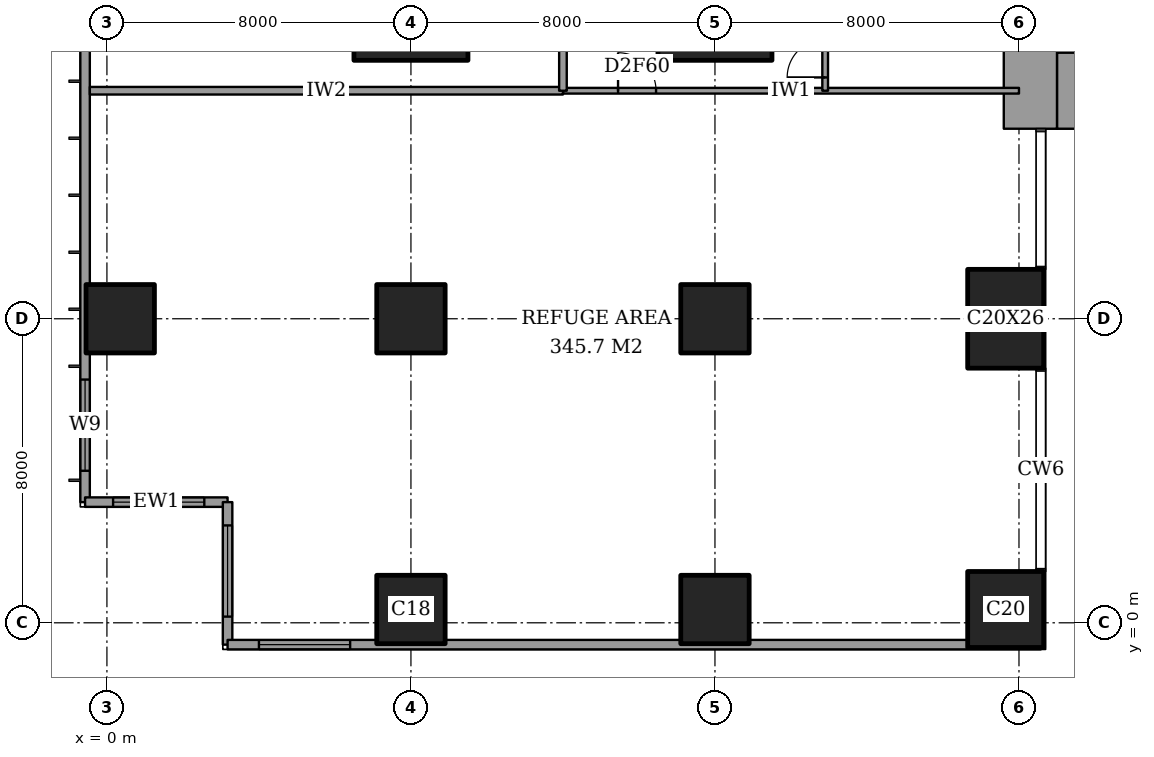
"""IFC4 building model, lengths in metres.
Left out: names, types, materials, properties, quantities, classifications, styles, units other than length and angle.
Written with IfcOpenShell. Run it as: python <this file> out.ifc"""

import sys

from ifc_helpers import new_model, si_unit, direction, frame, frame_2d, origin, origin_2d, place, context, subcontext, project, spatial, rectangle, extrude, element, fill, save


model = new_model("IFC4")
c1 = context("Model", 3, precision=1e-05, world=origin(), true_north=direction((0.0, 1.0)))
c2 = subcontext(c1, "Body", "Model", "MODEL_VIEW")
j1 = project(units=[si_unit("LENGTHUNIT", "METRE"), si_unit("PLANEANGLEUNIT", "RADIAN")], contexts=[c1])
p1 = place(None, origin())
s1 = spatial("IfcSite", under=j1, at=p1, CompositionType="ELEMENT")
p2 = place(p1, origin())
s2 = spatial("IfcBuilding", under=s1, at=p2, CompositionType="ELEMENT")
p3 = place(p2, frame((0.0, 0.0, 171.8)))
s3 = spatial("IfcBuildingStorey", under=s2, at=p3, CompositionType="ELEMENT", Elevation=171.8)
for number, where, z_axis, x_axis in (
    (1, (0.35, 8.0, 0.0), (0.0, 0.0, 1.0), (1.0, 0.0, 0.0)),
    (2, (8.0, 0.35, 0.0), (0.0, 0.0, 1.0), (1.0, 0.0, 0.0)),
    (3, (8.0, 8.0, 0.0), (0.0, 0.0, 1.0), (1.0, 0.0, 0.0)),
):
    element("IfcColumn", number, at=place(p3, frame(where, z_axis=z_axis, x_axis=x_axis)), inside=s3, PredefinedType="COLUMN", context=c2, shape_type="SweptSolid", body=[
        extrude(rectangle(XDim=1.8, YDim=1.8, at=origin_2d()), origin(), (0.0, 0.0, 1.0), 5.4),
    ])
p4 = place(p3, frame((8.0, 16.0, 0.0), z_axis=(0.0, 0.0, 1.0), x_axis=(1.0, 0.0, 0.0)))
e4 = element("IfcColumn", 4, at=p4, inside=s3, PredefinedType="COLUMN", context=c2, shape_type="SweptSolid", body=[
    extrude(rectangle(XDim=3.0, YDim=2.4, at=origin_2d()), origin(), (0.0, 0.0, 1.0), 5.4),
])
for number, where, z_axis, x_axis in (
    (5, (16.0, 0.35, 0.0), (0.0, 0.0, 1.0), (1.0, 0.0, 0.0)),
    (6, (16.0, 8.0, 0.0), (0.0, 0.0, 1.0), (1.0, 0.0, 0.0)),
):
    element("IfcColumn", number, at=place(p3, frame(where, z_axis=z_axis, x_axis=x_axis)), inside=s3, PredefinedType="COLUMN", context=c2, shape_type="SweptSolid", body=[
        extrude(rectangle(XDim=1.8, YDim=1.8, at=origin_2d()), origin(), (0.0, 0.0, 1.0), 5.4),
    ])
p5 = place(p3, frame((16.0, 16.0, 0.0), z_axis=(0.0, 0.0, 1.0), x_axis=(1.0, 0.0, 0.0)))
e7 = element("IfcColumn", 7, at=p5, inside=s3, PredefinedType="COLUMN", context=c2, shape_type="SweptSolid", body=[
    extrude(rectangle(XDim=3.0, YDim=2.4, at=origin_2d()), origin(), (0.0, 0.0, 1.0), 5.4),
])
p6 = place(p3, frame((23.65, 0.35, 0.0), z_axis=(0.0, 0.0, 1.0), x_axis=(1.0, 0.0, 0.0)))
e8 = element("IfcColumn", 8, at=p6, inside=s3, PredefinedType="COLUMN", context=c2, shape_type="SweptSolid", body=[
    extrude(rectangle(XDim=2.0, YDim=2.0, at=origin_2d()), origin(), (0.0, 0.0, 1.0), 5.4),
])
p7 = place(p3, frame((23.65, 8.0, 0.0), z_axis=(0.0, 0.0, 1.0), x_axis=(1.0, 0.0, 0.0)))
e9 = element("IfcColumn", 9, at=p7, inside=s3, PredefinedType="COLUMN", context=c2, shape_type="SweptSolid", body=[
    extrude(rectangle(XDim=2.0, YDim=2.6, at=origin_2d()), origin(), (0.0, 0.0, 1.0), 5.4),
])
p8 = place(p3, frame((25.0, 14.0, 0.0), z_axis=(0.0, 0.0, 1.0), x_axis=(1.0, 0.0, 0.0)))
e10 = element("IfcWall", 10, at=p8, inside=s3, PredefinedType="SHEAR", context=c2, shape_type="SweptSolid", body=[
    extrude(rectangle(XDim=3.15, YDim=2.0, at=frame_2d((1.575, 0.0))), origin(), (0.0, 0.0, 1.0), 5.4),
])
p9 = place(p3, frame((24.3, 13.0, 0.0), z_axis=(0.0, 0.0, 1.0), x_axis=(0.0, 1.0, 0.0)))
e11 = element("IfcWall", 11, at=p9, inside=s3, PredefinedType="SHEAR", context=c2, shape_type="SweptSolid", body=[
    extrude(rectangle(XDim=10.15, YDim=1.4, at=frame_2d((5.075, 0.0))), origin(), (0.0, 0.0, 1.0), 5.4),
])
p10 = place(p3, frame((-0.575, 44.825, 0.0), z_axis=(0.0, 0.0, 1.0), x_axis=(0.0, -1.0, 0.0)))
e12 = element("IfcWall", 12, at=p10, inside=s3, PredefinedType="SOLIDWALL", context=c2, shape_type="SweptSolid", body=[
    extrude(rectangle(XDim=41.65, YDim=0.25, at=frame_2d((20.825, 0.0))), origin(), (0.0, 0.0, 1.0), 5.4),
])
p11 = place(p10, frame((0.825, 0.0, 0.9)))
e13 = element("IfcOpeningElement", 13, at=p11, cuts=e12, PredefinedType="OPENING", context=c2, shape_type="SweptSolid", body=[
    extrude(rectangle(XDim=2.4, YDim=2.4, at=frame_2d((1.2, 1.2))), frame((0.0, 0.135, 0.0), z_axis=(0.0, -1.0, 0.0), x_axis=(1.0, 0.0, 0.0)), (0.0, 0.0, 1.0), 0.27),
])
p12 = place(p10, frame((38.425, 0.0, 0.9)))
e14 = element("IfcOpeningElement", 14, at=p12, cuts=e12, PredefinedType="OPENING", context=c2, shape_type="SweptSolid", body=[
    extrude(rectangle(XDim=2.4, YDim=2.4, at=frame_2d((1.2, 1.2))), frame((0.0, 0.135, 0.0), z_axis=(0.0, -1.0, 0.0), x_axis=(1.0, 0.0, 0.0)), (0.0, 0.0, 1.0), 0.27),
])
p13 = place(p3, frame((-0.575, 3.175, 0.0), z_axis=(0.0, 0.0, 1.0), x_axis=(1.0, 0.0, 0.0)))
e15 = element("IfcWall", 15, at=p13, inside=s3, PredefinedType="SOLIDWALL", context=c2, shape_type="SweptSolid", body=[
    extrude(rectangle(XDim=3.75, YDim=0.25, at=frame_2d((1.875, 0.0))), origin(), (0.0, 0.0, 1.0), 5.4),
])
p14 = place(p13, frame((0.738, 0.0, 0.9)))
e16 = element("IfcOpeningElement", 16, at=p14, cuts=e15, PredefinedType="OPENING", context=c2, shape_type="SweptSolid", body=[
    extrude(rectangle(XDim=2.4, YDim=2.4, at=frame_2d((1.2, 1.2))), frame((0.0, 0.135, 0.0), z_axis=(0.0, -1.0, 0.0), x_axis=(1.0, 0.0, 0.0)), (0.0, 0.0, 1.0), 0.27),
])
p15 = place(p3, frame((3.175, 3.175, 0.0), z_axis=(0.0, 0.0, 1.0), x_axis=(0.0, -1.0, 0.0)))
e17 = element("IfcWall", 17, at=p15, inside=s3, PredefinedType="SOLIDWALL", context=c2, shape_type="SweptSolid", body=[
    extrude(rectangle(XDim=3.75, YDim=0.25, at=frame_2d((1.875, 0.0))), origin(), (0.0, 0.0, 1.0), 5.4),
])
p16 = place(p15, frame((0.613, 0.0, 0.9)))
e18 = element("IfcOpeningElement", 18, at=p16, cuts=e17, PredefinedType="OPENING", context=c2, shape_type="SweptSolid", body=[
    extrude(rectangle(XDim=2.4, YDim=2.4, at=frame_2d((1.2, 1.2))), frame((0.0, 0.135, 0.0), z_axis=(0.0, -1.0, 0.0), x_axis=(1.0, 0.0, 0.0)), (0.0, 0.0, 1.0), 0.27),
])
p17 = place(p3, frame((3.175, -0.575, 0.0), z_axis=(0.0, 0.0, 1.0), x_axis=(1.0, 0.0, 0.0)))
e19 = element("IfcWall", 19, at=p17, inside=s3, PredefinedType="SOLIDWALL", context=c2, shape_type="SweptSolid", body=[
    extrude(rectangle(XDim=21.4, YDim=0.25, at=frame_2d((10.7, 0.0))), origin(), (0.0, 0.0, 1.0), 5.4),
])
p18 = place(p17, frame((0.825, 0.0, 0.9)))
e20 = element("IfcOpeningElement", 20, at=p18, cuts=e19, PredefinedType="OPENING", context=c2, shape_type="SweptSolid", body=[
    extrude(rectangle(XDim=2.4, YDim=2.4, at=frame_2d((1.2, 1.2))), frame((0.0, 0.135, 0.0), z_axis=(0.0, -1.0, 0.0), x_axis=(1.0, 0.0, 0.0)), (0.0, 0.0, 1.0), 0.27),
])
p19 = place(p3, frame((-0.45, 14.0, 0.0), z_axis=(0.0, 0.0, 1.0), x_axis=(1.0, 0.0, 0.0)))
e21 = element("IfcWall", 21, at=p19, inside=s3, PredefinedType="PARTITIONING", context=c2, shape_type="SweptSolid", body=[
    extrude(rectangle(XDim=12.45, YDim=0.2, at=frame_2d((6.225, 0.0))), origin(), (0.0, 0.0, 1.0), 5.15),
])
p20 = place(p3, frame((12.0, 14.0, 0.0), z_axis=(0.0, 0.0, 1.0), x_axis=(1.0, 0.0, 0.0)))
e22 = element("IfcWall", 22, at=p20, inside=s3, PredefinedType="PARTITIONING", context=c2, shape_type="SweptSolid", body=[
    extrude(rectangle(XDim=12.0, YDim=0.15, at=frame_2d((6.0, 0.0))), origin(), (0.0, 0.0, 1.0), 5.15),
])
p21 = place(p20, frame((1.45, 0.0, 0.0)))
e23 = element("IfcOpeningElement", 23, at=p21, cuts=e22, PredefinedType="OPENING", context=c2, shape_type="SweptSolid", body=[
    extrude(rectangle(XDim=1.0, YDim=2.1, at=frame_2d((0.5, 1.05))), frame((0.0, 0.085, 0.0), z_axis=(0.0, -1.0, 0.0), x_axis=(1.0, 0.0, 0.0)), (0.0, 0.0, 1.0), 0.17),
])
p22 = place(p3, frame((12.0, 14.0, 0.0), z_axis=(0.0, 0.0, 1.0), x_axis=(0.0, 1.0, 0.0)))
e24 = element("IfcWall", 24, at=p22, inside=s3, PredefinedType="PARTITIONING", context=c2, shape_type="SweptSolid", body=[
    extrude(rectangle(XDim=14.725, YDim=0.2, at=frame_2d((7.363, 0.0))), origin(), (0.0, 0.0, 1.0), 5.15),
])
p23 = place(p22, frame((6.863, 0.0, 0.0)))
e25 = element("IfcOpeningElement", 25, at=p23, cuts=e24, PredefinedType="OPENING", context=c2, shape_type="SweptSolid", body=[
    extrude(rectangle(XDim=1.0, YDim=2.1, at=frame_2d((0.5, 1.05))), frame((0.0, 0.11, 0.0), z_axis=(0.0, -1.0, 0.0), x_axis=(1.0, 0.0, 0.0)), (0.0, 0.0, 1.0), 0.22),
])
p24 = place(p3, frame((18.9, 14.0, 0.0), z_axis=(0.0, 0.0, 1.0), x_axis=(0.0, 1.0, 0.0)))
e26 = element("IfcWall", 26, at=p24, inside=s3, PredefinedType="PARTITIONING", context=c2, shape_type="SweptSolid", body=[
    extrude(rectangle(XDim=6.0, YDim=0.15, at=frame_2d((3.0, 0.0))), origin(), (0.0, 0.0, 1.0), 5.15),
])
p25 = place(p24, frame((0.35, 0.0, 0.0)))
e27 = element("IfcOpeningElement", 27, at=p25, cuts=e26, PredefinedType="OPENING", context=c2, shape_type="SweptSolid", body=[
    extrude(rectangle(XDim=1.0, YDim=2.1, at=frame_2d((0.5, 1.05))), frame((0.0, 0.085, 0.0), z_axis=(0.0, -1.0, 0.0), x_axis=(1.0, 0.0, 0.0)), (0.0, 0.0, 1.0), 0.17),
])
p26 = place(p24, frame((4.25, 0.0, 0.0)))
e28 = element("IfcOpeningElement", 28, at=p26, cuts=e26, PredefinedType="OPENING", context=c2, shape_type="SweptSolid", body=[
    extrude(rectangle(XDim=1.0, YDim=2.1, at=frame_2d((0.5, 1.05))), frame((0.0, 0.085, 0.0), z_axis=(0.0, -1.0, 0.0), x_axis=(1.0, 0.0, 0.0)), (0.0, 0.0, 1.0), 0.17),
])
p27 = place(p12, origin())
e29 = element("IfcWindow", 29, at=p27, inside=s3, PartitioningType="SINGLE_PANEL", PredefinedType="WINDOW", context=c2, shape_type="SweptSolid", body=[
    extrude(rectangle(XDim=2.4, YDim=2.4, at=frame_2d((1.2, 1.2))), frame((0.0, 0.03, 0.0), z_axis=(0.0, -1.0, 0.0), x_axis=(1.0, 0.0, 0.0)), (0.0, 0.0, 1.0), 0.06),
])
fill(e14, e29)
p28 = place(p14, origin())
e30 = element("IfcWindow", 30, at=p28, inside=s3, PartitioningType="SINGLE_PANEL", PredefinedType="WINDOW", context=c2, shape_type="SweptSolid", body=[
    extrude(rectangle(XDim=2.4, YDim=2.4, at=frame_2d((1.2, 1.2))), frame((0.0, 0.03, 0.0), z_axis=(0.0, -1.0, 0.0), x_axis=(1.0, 0.0, 0.0)), (0.0, 0.0, 1.0), 0.06),
])
fill(e16, e30)
p29 = place(p16, origin())
e31 = element("IfcWindow", 31, at=p29, inside=s3, PartitioningType="SINGLE_PANEL", PredefinedType="WINDOW", context=c2, shape_type="SweptSolid", body=[
    extrude(rectangle(XDim=2.4, YDim=2.4, at=frame_2d((1.2, 1.2))), frame((0.0, 0.03, 0.0), z_axis=(0.0, -1.0, 0.0), x_axis=(1.0, 0.0, 0.0)), (0.0, 0.0, 1.0), 0.06),
])
fill(e18, e31)
p30 = place(p18, origin())
e32 = element("IfcWindow", 32, at=p30, inside=s3, PartitioningType="SINGLE_PANEL", PredefinedType="WINDOW", context=c2, shape_type="SweptSolid", body=[
    extrude(rectangle(XDim=2.4, YDim=2.4, at=frame_2d((1.2, 1.2))), frame((0.0, 0.03, 0.0), z_axis=(0.0, -1.0, 0.0), x_axis=(1.0, 0.0, 0.0)), (0.0, 0.0, 1.0), 0.06),
])
fill(e20, e32)
p31 = place(p21, origin())
e33 = element("IfcDoor", 33, at=p31, inside=s3, OperationType="SINGLE_SWING_RIGHT", PredefinedType="DOOR", context=c2, shape_type="SweptSolid", body=[
    extrude(rectangle(XDim=1.0, YDim=2.1, at=frame_2d((0.5, 1.05))), frame((0.0, 0.025, 0.0), z_axis=(0.0, -1.0, 0.0), x_axis=(1.0, 0.0, 0.0)), (0.0, 0.0, 1.0), 0.05),
])
fill(e23, e33)
p32 = place(p25, origin())
e34 = element("IfcDoor", 34, at=p32, inside=s3, OperationType="SINGLE_SWING_RIGHT", PredefinedType="DOOR", context=c2, shape_type="SweptSolid", body=[
    extrude(rectangle(XDim=1.0, YDim=2.1, at=frame_2d((0.5, 1.05))), frame((0.0, 0.025, 0.0), z_axis=(0.0, -1.0, 0.0), x_axis=(1.0, 0.0, 0.0)), (0.0, 0.0, 1.0), 0.05),
])
fill(e27, e34)
save(model, sys.argv[1])
